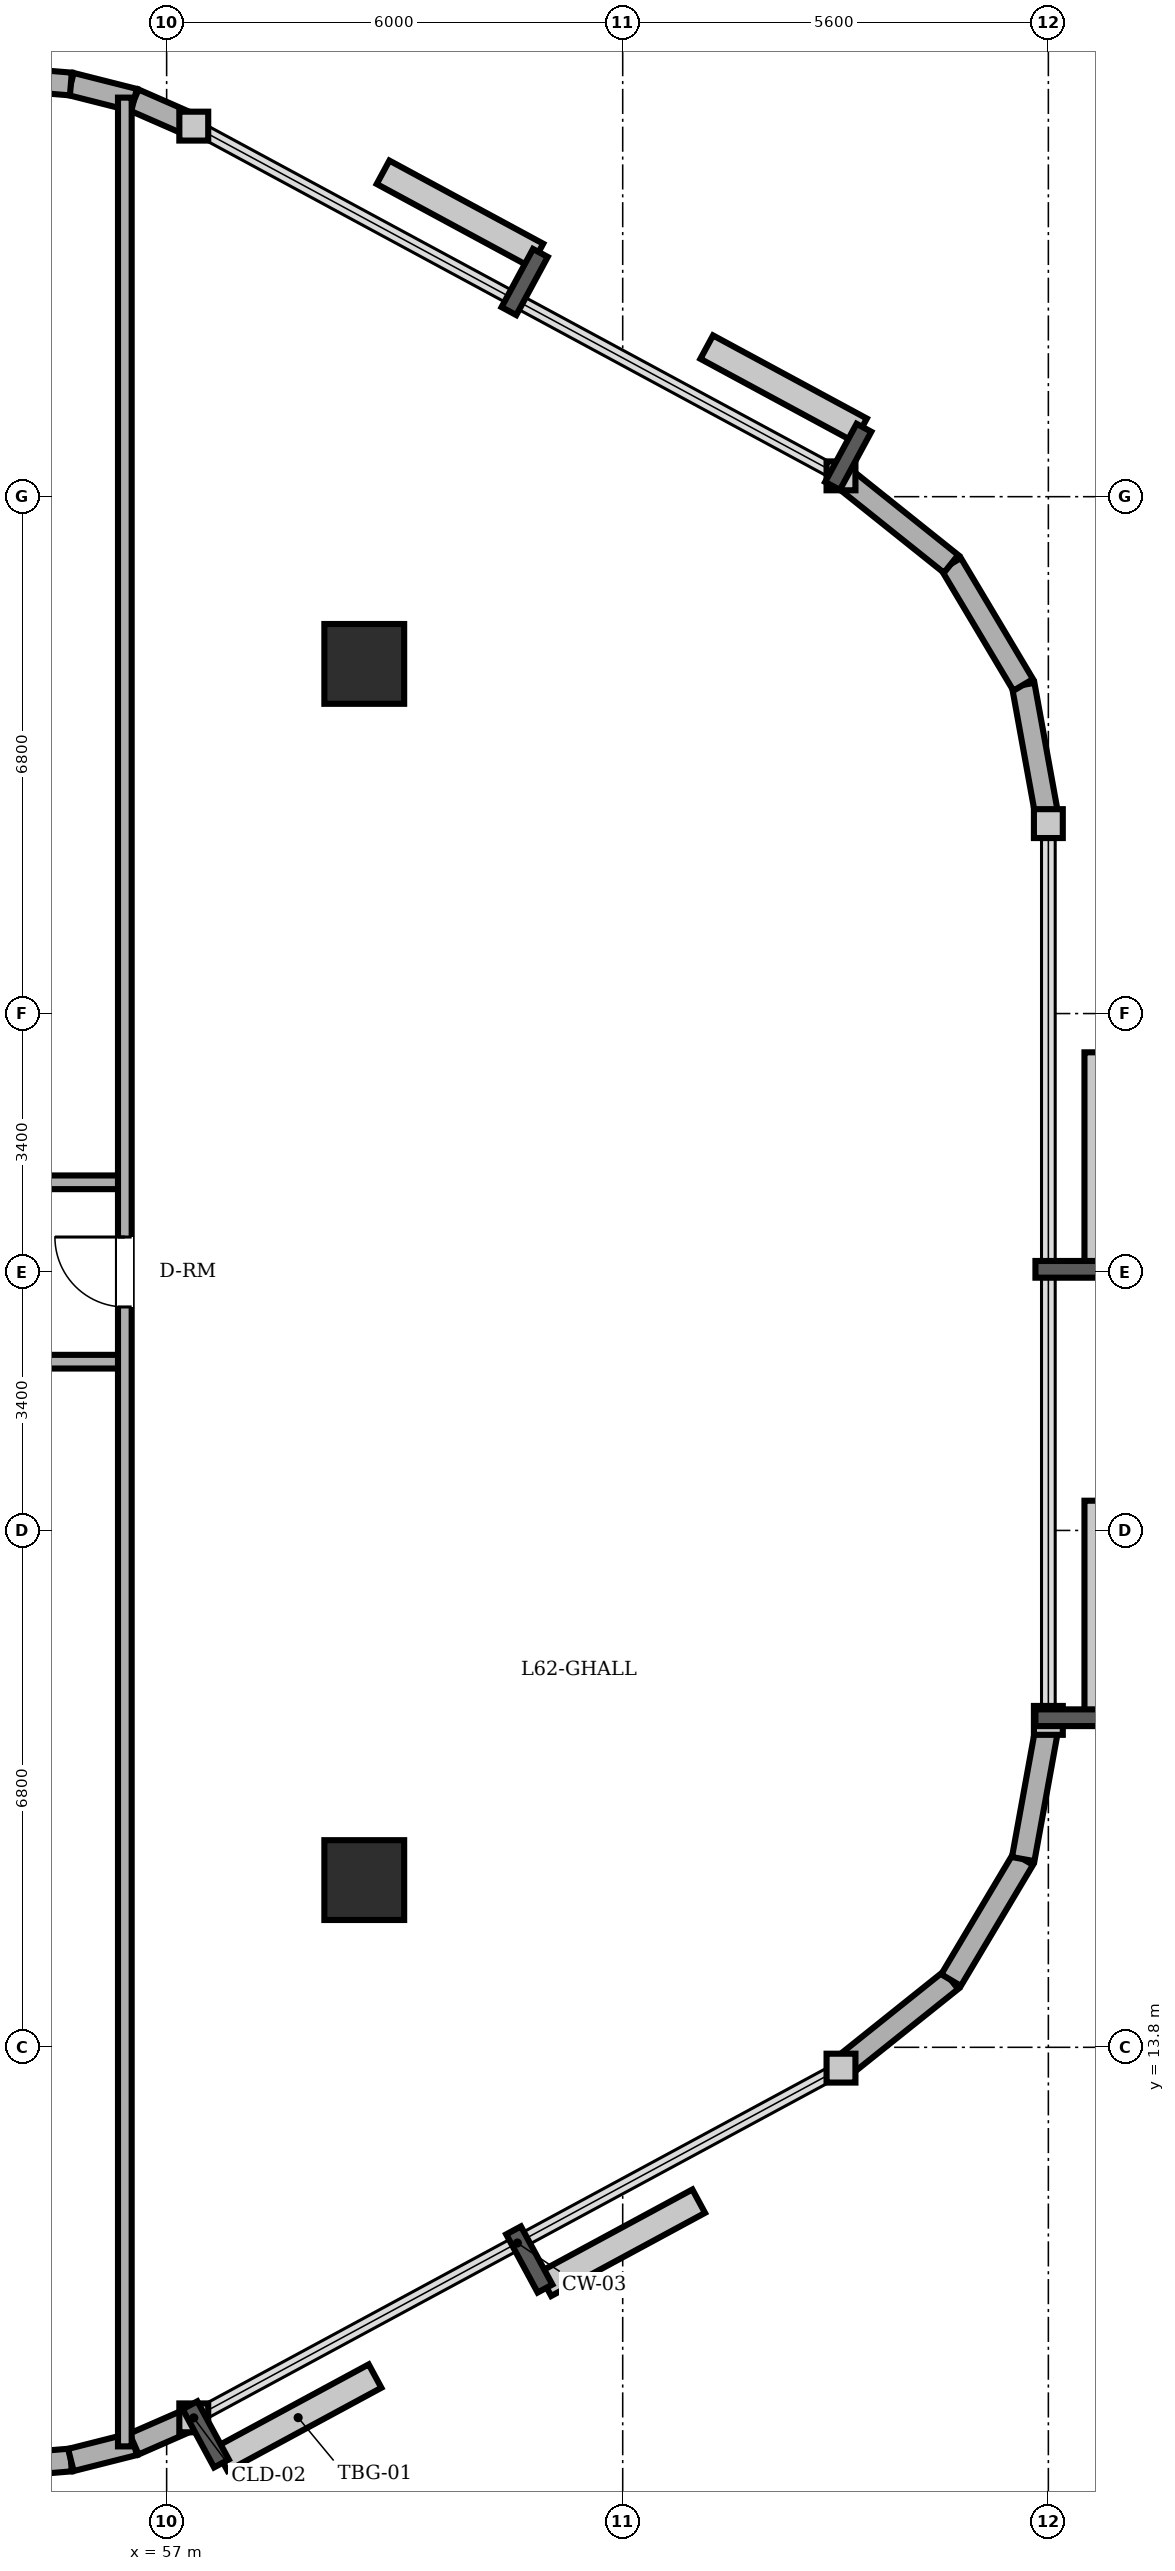
"""IFC4 building model, lengths in metres.
Left out: names, types, materials, properties, quantities, classifications, styles, units other than length and angle.
Written with IfcOpenShell. Run it as: python <this file> out.ifc"""

import sys

from ifc_helpers import new_model, si_unit, direction, frame, frame_2d, origin, origin_2d, place, context, subcontext, project, spatial, rectangle, circle, extrude, element, fill, save


model = new_model("IFC4")
c1 = context("Model", 3, precision=1e-05, world=origin(), true_north=direction((0.0, 1.0)))
c2 = subcontext(c1, "Body", "Model", "MODEL_VIEW")
j1 = project(units=[si_unit("LENGTHUNIT", "METRE"), si_unit("PLANEANGLEUNIT", "RADIAN")], contexts=[c1])
p1 = place(None, origin())
s1 = spatial("IfcSite", under=j1, at=p1, CompositionType="ELEMENT")
p2 = place(p1, origin())
s2 = spatial("IfcBuilding", under=s1, at=p2, CompositionType="ELEMENT")
p3 = place(p2, frame((0.0, 0.0, 237.3)))
s3 = spatial("IfcBuildingStorey", under=s2, at=p3, CompositionType="ELEMENT", Elevation=237.3)
for number, where, z_axis, x_axis in (
    (1, (59.6, 16.0, 0.0), (0.0, 0.0, 1.0), (1.0, 0.0, 0.0)),
    (2, (59.6, 32.0, 0.0), (0.0, 0.0, 1.0), (1.0, 0.0, 0.0)),
):
    element("IfcColumn", number, at=place(p3, frame(where, z_axis=z_axis, x_axis=x_axis)), inside=s3, PredefinedType="COLUMN", context=c2, shape_type="SweptSolid", body=[
        extrude(circle(Radius=0.525, at=origin_2d()), origin(), (0.0, 0.0, 1.0), 3.6),
    ])
p4 = place(p3, frame((54.885, 8.3, 0.0), z_axis=(0.0, 0.0, 1.0), x_axis=(0.996565355958, 0.082809971041, 0.0)))
e3 = element("IfcWall", 3, at=p4, inside=s3, PredefinedType="SOLIDWALL", context=c2, shape_type="SweptSolid", body=[
    extrude(rectangle(XDim=0.858, YDim=0.3, at=frame_2d((0.429, 0.0))), origin(), (0.0, 0.0, 1.0), 3.4),
])
p5 = place(p3, frame((55.74, 8.371, 0.0), z_axis=(0.0, 0.0, 1.0), x_axis=(0.969536346338, 0.244947490555, 0.0)))
e4 = element("IfcWall", 4, at=p5, inside=s3, PredefinedType="SOLIDWALL", context=c2, shape_type="SweptSolid", body=[
    extrude(rectangle(XDim=0.857, YDim=0.3, at=frame_2d((0.429, 0.0))), origin(), (0.0, 0.0, 1.0), 3.4),
])
p6 = place(p3, frame((56.571, 8.581, 0.0), z_axis=(0.0, 0.0, 1.0), x_axis=(0.916085473636, 0.400983048261, 0.0)))
e5 = element("IfcWall", 5, at=p6, inside=s3, PredefinedType="SOLIDWALL", context=c2, shape_type="SweptSolid", body=[
    extrude(rectangle(XDim=0.858, YDim=0.3, at=frame_2d((0.429, 0.0))), origin(), (0.0, 0.0, 1.0), 3.4),
])
p7 = place(p3, frame((65.872, 13.526, 0.0), z_axis=(0.0, 0.0, 1.0), x_axis=(0.780920189257, 0.624630817372, 0.0)))
e6 = element("IfcWall", 6, at=p7, inside=s3, PredefinedType="SOLIDWALL", context=c2, shape_type="SweptSolid", body=[
    extrude(rectangle(XDim=1.854, YDim=0.3, at=frame_2d((0.927, 0.0))), origin(), (0.0, 0.0, 1.0), 3.4),
])
p8 = place(p3, frame((67.32, 14.684, 0.0), z_axis=(0.0, 0.0, 1.0), x_axis=(0.512072018927, 0.858942516955, 0.0)))
e7 = element("IfcWall", 7, at=p8, inside=s3, PredefinedType="SOLIDWALL", context=c2, shape_type="SweptSolid", body=[
    extrude(rectangle(XDim=1.853, YDim=0.3, at=frame_2d((0.927, 0.0))), origin(), (0.0, 0.0, 1.0), 3.4),
])
for number, where, z_axis, x_axis in (
    (8, (68.269, 16.276, 0.0), (0.0, 0.0, 1.0), (0.178, 0.984, 0.0)),
    (9, (68.6, 29.899, 0.0), (0.0, 0.0, 1.0), (-0.178, 0.984, 0.0)),
):
    element("IfcWall", number, at=place(p3, frame(where, z_axis=z_axis, x_axis=x_axis)), inside=s3, PredefinedType="SOLIDWALL", context=c2, shape_type="SweptSolid", body=[
        extrude(rectangle(XDim=1.855, YDim=0.3, at=frame_2d((0.927, 0.0))), origin(), (0.0, 0.0, 1.0), 3.4),
    ])
p9 = place(p3, frame((68.269, 31.724, 0.0), z_axis=(0.0, 0.0, 1.0), x_axis=(-0.512072018927, 0.858942516955, 0.0)))
e10 = element("IfcWall", 10, at=p9, inside=s3, PredefinedType="SOLIDWALL", context=c2, shape_type="SweptSolid", body=[
    extrude(rectangle(XDim=1.853, YDim=0.3, at=frame_2d((0.927, 0.0))), origin(), (0.0, 0.0, 1.0), 3.4),
])
p10 = place(p3, frame((67.32, 33.316, 0.0), z_axis=(0.0, 0.0, 1.0), x_axis=(-0.780920189257, 0.624630817372, 0.0)))
e11 = element("IfcWall", 11, at=p10, inside=s3, PredefinedType="SOLIDWALL", context=c2, shape_type="SweptSolid", body=[
    extrude(rectangle(XDim=1.854, YDim=0.3, at=frame_2d((0.927, 0.0))), origin(), (0.0, 0.0, 1.0), 3.4),
])
p11 = place(p3, frame((57.357, 39.075, 0.0), z_axis=(0.0, 0.0, 1.0), x_axis=(-0.916085473636, 0.400983048261, 0.0)))
e12 = element("IfcWall", 12, at=p11, inside=s3, PredefinedType="SOLIDWALL", context=c2, shape_type="SweptSolid", body=[
    extrude(rectangle(XDim=0.858, YDim=0.3, at=frame_2d((0.429, 0.0))), origin(), (0.0, 0.0, 1.0), 3.4),
])
p12 = place(p3, frame((56.571, 39.419, 0.0), z_axis=(0.0, 0.0, 1.0), x_axis=(-0.969536346338, 0.244947490555, 0.0)))
e13 = element("IfcWall", 13, at=p12, inside=s3, PredefinedType="SOLIDWALL", context=c2, shape_type="SweptSolid", body=[
    extrude(rectangle(XDim=0.857, YDim=0.3, at=frame_2d((0.429, 0.0))), origin(), (0.0, 0.0, 1.0), 3.4),
])
p13 = place(p3, frame((55.74, 39.629, 0.0), z_axis=(0.0, 0.0, 1.0), x_axis=(-0.996565355958, 0.082809971041, 0.0)))
e14 = element("IfcWall", 14, at=p13, inside=s3, PredefinedType="SOLIDWALL", context=c2, shape_type="SweptSolid", body=[
    extrude(rectangle(XDim=0.858, YDim=0.3, at=frame_2d((0.429, 0.0))), origin(), (0.0, 0.0, 1.0), 3.4),
])
p14 = place(p3, frame((41.75, 22.82, 0.0), z_axis=(0.0, 0.0, 1.0), x_axis=(1.0, 0.0, 0.0)))
e15 = element("IfcWall", 15, at=p14, inside=s3, PredefinedType="PARTITIONING", context=c2, shape_type="SweptSolid", body=[
    extrude(rectangle(XDim=14.7, YDim=0.18, at=frame_2d((7.35, 0.0))), origin(), (0.0, 0.0, 1.0), 3.4),
])
p15 = place(p14, frame((6.89, 0.0, 0.0)))
e16 = element("IfcOpeningElement", 16, at=p15, cuts=e15, PredefinedType="OPENING", context=c2, shape_type="SweptSolid", body=[
    extrude(rectangle(XDim=0.92, YDim=2.1, at=frame_2d((0.46, 1.05))), frame((0.0, 0.1, 0.0), z_axis=(0.0, -1.0, 0.0), x_axis=(1.0, 0.0, 0.0)), (0.0, 0.0, 1.0), 0.2),
])
p16 = place(p3, frame((41.75, 25.18, 0.0), z_axis=(0.0, 0.0, 1.0), x_axis=(1.0, 0.0, 0.0)))
e17 = element("IfcWall", 17, at=p16, inside=s3, PredefinedType="PARTITIONING", context=c2, shape_type="SweptSolid", body=[
    extrude(rectangle(XDim=14.7, YDim=0.18, at=frame_2d((7.35, 0.0))), origin(), (0.0, 0.0, 1.0), 3.4),
])
p17 = place(p16, frame((6.89, 0.0, 0.0)))
e18 = element("IfcOpeningElement", 18, at=p17, cuts=e17, PredefinedType="OPENING", context=c2, shape_type="SweptSolid", body=[
    extrude(rectangle(XDim=0.92, YDim=2.1, at=frame_2d((0.46, 1.05))), frame((0.0, 0.1, 0.0), z_axis=(0.0, -1.0, 0.0), x_axis=(1.0, 0.0, 0.0)), (0.0, 0.0, 1.0), 0.2),
])
p18 = place(p3, frame((56.45, 8.55, 0.0), z_axis=(0.0, 0.0, 1.0), x_axis=(0.0, 1.0, 0.0)))
e19 = element("IfcWall", 19, at=p18, inside=s3, PredefinedType="PARTITIONING", context=c2, shape_type="SweptSolid", body=[
    extrude(rectangle(XDim=30.9, YDim=0.18, at=frame_2d((15.45, 0.0))), origin(), (0.0, 0.0, 1.0), 3.4),
])
p19 = place(p18, frame((14.99, 0.0, 0.0)))
e20 = element("IfcOpeningElement", 20, at=p19, cuts=e19, PredefinedType="OPENING", context=c2, shape_type="SweptSolid", body=[
    extrude(rectangle(XDim=0.92, YDim=2.1, at=frame_2d((0.46, 1.05))), frame((0.0, 0.1, 0.0), z_axis=(0.0, -1.0, 0.0), x_axis=(1.0, 0.0, 0.0)), (0.0, 0.0, 1.0), 0.2),
])
p20 = place(p19, origin())
e21 = element("IfcDoor", 21, at=p20, inside=s3, OperationType="SINGLE_SWING_RIGHT", PredefinedType="DOOR", context=c2, shape_type="SweptSolid", body=[
    extrude(rectangle(XDim=0.92, YDim=2.1, at=frame_2d((0.46, 1.05))), frame((0.0, 0.025, 0.0), z_axis=(0.0, -1.0, 0.0), x_axis=(1.0, 0.0, 0.0)), (0.0, 0.0, 1.0), 0.05),
])
fill(e20, e21)
save(model, sys.argv[1])
